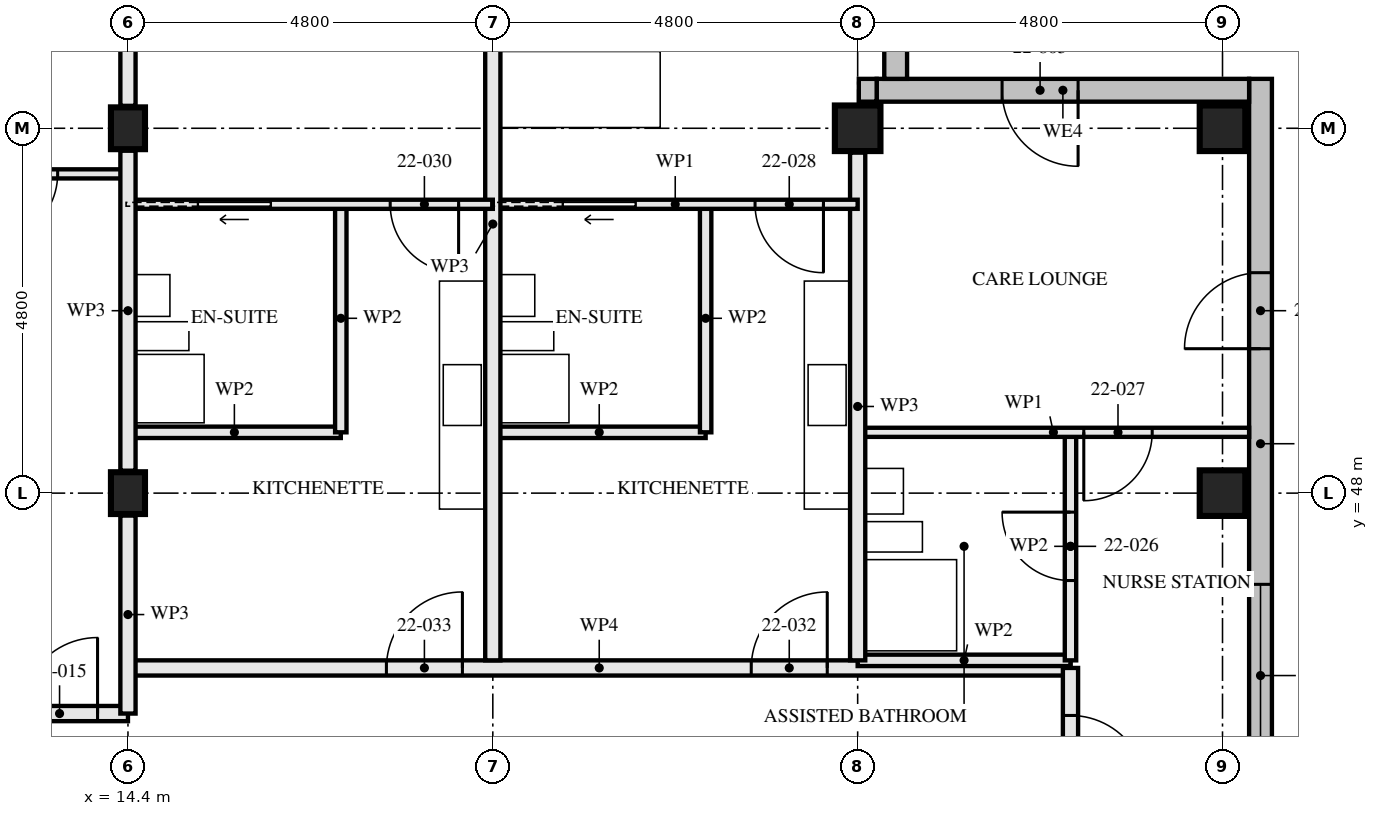
"""IFC4 building model, lengths in metres.
Left out: names, types, materials, properties, quantities, classifications, styles, units other than length and angle.
Written with IfcOpenShell. Run it as: python <this file> out.ifc"""

import sys

from ifc_helpers import new_model, si_unit, direction, frame, frame_2d, origin, origin_2d, place, context, subcontext, project, spatial, rectangle, hollow_rectangle, i_section, extrude, element, fill, save


model = new_model("IFC4")
c1 = context("Model", 3, precision=1e-05, world=origin(), true_north=direction((0.0, 1.0)))
c2 = subcontext(c1, "Body", "Model", "MODEL_VIEW")
j1 = project(units=[si_unit("LENGTHUNIT", "METRE"), si_unit("PLANEANGLEUNIT", "RADIAN")], contexts=[c1])
p1 = place(None, origin())
s1 = spatial("IfcSite", under=j1, at=p1, CompositionType="ELEMENT")
p2 = place(p1, origin())
s2 = spatial("IfcBuilding", under=s1, at=p2, CompositionType="ELEMENT")
p3 = place(p2, frame((0.0, 0.0, 84.0)))
s3 = spatial("IfcBuildingStorey", under=s2, at=p3, CompositionType="ELEMENT", Elevation=84.0)
for number, where, z_axis, x_axis in (
    (1, (14.4, 48.0, 0.0), (0.0, 0.0, 1.0), (1.0, 0.0, 0.0)),
    (2, (14.4, 52.8, 0.0), (0.0, 0.0, 1.0), (1.0, 0.0, 0.0)),
):
    element("IfcColumn", number, at=place(p3, frame(where, z_axis=z_axis, x_axis=x_axis)), inside=s3, PredefinedType="COLUMN", context=c2, shape_type="SweptSolid", body=[
        extrude(i_section(OverallWidth=0.448, OverallDepth=0.55, WebThickness=0.072, FlangeThickness=0.115, FilletRadius=0.015, at=origin_2d()), origin(), (0.0, 0.0, 1.0), 3.5),
    ])
for number, where, z_axis, x_axis in (
    (3, (24.0, 52.8, 0.0), (0.0, 0.0, 1.0), (0.0, 1.0, 0.0)),
    (4, (28.8, 48.0, 0.0), (0.0, 0.0, 1.0), (1.0, 0.0, 0.0)),
    (5, (28.8, 52.8, 0.0), (0.0, 0.0, 1.0), (0.0, 1.0, 0.0)),
):
    element("IfcColumn", number, at=place(p3, frame(where, z_axis=z_axis, x_axis=x_axis)), inside=s3, PredefinedType="COLUMN", context=c2, shape_type="SweptSolid", body=[
        extrude(hollow_rectangle(XDim=0.6, YDim=0.6, WallThickness=0.08, at=origin_2d()), origin(), (0.0, 0.0, 1.0), 3.5),
    ])
p4 = place(p3, frame((29.3, 43.85, 0.0), z_axis=(0.0, 0.0, 1.0), x_axis=(0.0, 1.0, 0.0)))
e6 = element("IfcWall", 6, at=p4, inside=s3, PredefinedType="SOLIDWALL", context=c2, shape_type="SweptSolid", body=[
    extrude(rectangle(XDim=9.6, YDim=0.3, at=frame_2d((4.8, 0.0))), origin(), (0.0, 0.0, 1.0), 3.5),
])
p5 = place(p4, frame((6.05, 0.0, 0.0)))
e7 = element("IfcOpeningElement", 7, at=p5, cuts=e6, PredefinedType="OPENING", context=c2, shape_type="SweptSolid", body=[
    extrude(rectangle(XDim=1.0, YDim=2.4, at=frame_2d((0.5, 1.2))), frame((0.0, 0.161, 0.0), z_axis=(0.0, -1.0, 0.0), x_axis=(1.0, 0.0, 0.0)), (0.0, 0.0, 1.0), 0.321),
])
p6 = place(p4, frame((0.55, 0.0, 0.6)))
e8 = element("IfcOpeningElement", 8, at=p6, cuts=e6, PredefinedType="OPENING", context=c2, shape_type="SweptSolid", body=[
    extrude(rectangle(XDim=2.4, YDim=1.8, at=frame_2d((1.2, 0.9))), frame((0.0, 0.161, 0.0), z_axis=(0.0, -1.0, 0.0), x_axis=(1.0, 0.0, 0.0)), (0.0, 0.0, 1.0), 0.321),
])
p7 = place(p3, frame((29.15, 53.3, 0.0), z_axis=(0.0, 0.0, 1.0), x_axis=(-1.0, 0.0, 0.0)))
e9 = element("IfcWall", 9, at=p7, inside=s3, PredefinedType="SOLIDWALL", context=c2, shape_type="SweptSolid", body=[
    extrude(rectangle(XDim=4.9, YDim=0.3, at=frame_2d((2.45, 0.0))), origin(), (0.0, 0.0, 1.0), 3.5),
])
p8 = place(p7, frame((2.25, 0.0, 0.0)))
e10 = element("IfcOpeningElement", 10, at=p8, cuts=e9, PredefinedType="OPENING", context=c2, shape_type="SweptSolid", body=[
    extrude(rectangle(XDim=1.0, YDim=2.4, at=frame_2d((0.5, 1.2))), frame((0.0, 0.161, 0.0), z_axis=(0.0, -1.0, 0.0), x_axis=(1.0, 0.0, 0.0)), (0.0, 0.0, 1.0), 0.321),
])
p9 = place(p3, frame((24.5, 53.45, 0.0), z_axis=(0.0, 0.0, 1.0), x_axis=(0.0, 1.0, 0.0)))
e11 = element("IfcWall", 11, at=p9, inside=s3, PredefinedType="SOLIDWALL", context=c2, shape_type="SweptSolid", body=[
    extrude(rectangle(XDim=4.5, YDim=0.3, at=frame_2d((2.25, 0.0))), origin(), (0.0, 0.0, 1.0), 3.5),
])
p10 = place(p9, frame((1.25, 0.0, 0.0)))
e12 = element("IfcOpeningElement", 12, at=p10, cuts=e11, PredefinedType="OPENING", context=c2, shape_type="SweptSolid", body=[
    extrude(rectangle(XDim=1.0, YDim=2.4, at=frame_2d((0.5, 1.2))), frame((0.0, 0.161, 0.0), z_axis=(0.0, -1.0, 0.0), x_axis=(1.0, 0.0, 0.0)), (0.0, 0.0, 1.0), 0.321),
])
p11 = place(p3, frame((24.25, 53.3, 2.39), z_axis=(0.0, 0.0, 1.0), x_axis=(-1.0, 0.0, 0.0)))
e13 = element("IfcWall", 13, at=p11, inside=s3, PredefinedType="SOLIDWALL", context=c2, shape_type="SweptSolid", body=[
    extrude(rectangle(XDim=0.235, YDim=0.3, at=frame_2d((0.118, 0.0))), origin(), (0.0, 0.0, 1.0), 0.88),
])
p12 = place(p3, frame((14.4, 52.2, 0.0), z_axis=(0.0, 0.0, 1.0), x_axis=(-1.0, 0.0, 0.0)))
e14 = element("IfcWall", 14, at=p12, inside=s3, PredefinedType="PARTITIONING", context=c2, shape_type="SweptSolid", body=[
    extrude(rectangle(XDim=4.8, YDim=0.12, at=frame_2d((2.4, 0.0))), origin(), (0.0, 0.0, 1.0), 3.33),
])
p13 = place(p12, frame((0.925, 0.0, 0.0)))
e15 = element("IfcOpeningElement", 15, at=p13, cuts=e14, PredefinedType="OPENING", context=c2, shape_type="SweptSolid", body=[
    extrude(rectangle(XDim=0.9, YDim=2.1, at=frame_2d((0.45, 1.05))), frame((0.0, 0.071, 0.0), z_axis=(0.0, -1.0, 0.0), x_axis=(1.0, 0.0, 0.0)), (0.0, 0.0, 1.0), 0.141),
])
p14 = place(p12, frame((2.925, 0.0, 0.0)))
e16 = element("IfcOpeningElement", 16, at=p14, cuts=e14, PredefinedType="OPENING", context=c2, shape_type="SweptSolid", body=[
    extrude(rectangle(XDim=0.95, YDim=2.1, at=frame_2d((0.475, 1.05))), frame((0.0, 0.071, 0.0), z_axis=(0.0, -1.0, 0.0), x_axis=(1.0, 0.0, 0.0)), (0.0, 0.0, 1.0), 0.141),
])
p15 = place(p3, frame((14.4, 45.1, 0.0), z_axis=(0.0, 0.0, 1.0), x_axis=(-1.0, 0.0, 0.0)))
e17 = element("IfcWall", 17, at=p15, inside=s3, PredefinedType="PARTITIONING", context=c2, shape_type="SweptSolid", body=[
    extrude(rectangle(XDim=9.6, YDim=0.2, at=frame_2d((4.8, 0.0))), origin(), (0.0, 0.0, 1.0), 3.33),
])
p16 = place(p15, frame((0.4, 0.0, 0.0)))
e18 = element("IfcOpeningElement", 18, at=p16, cuts=e17, PredefinedType="OPENING", context=c2, shape_type="SweptSolid", body=[
    extrude(rectangle(XDim=1.0, YDim=2.1, at=frame_2d((0.5, 1.05))), frame((0.0, 0.111, 0.0), z_axis=(0.0, -1.0, 0.0), x_axis=(1.0, 0.0, 0.0)), (0.0, 0.0, 1.0), 0.221),
])
p17 = place(p15, frame((5.2, 0.0, 0.0)))
e19 = element("IfcOpeningElement", 19, at=p17, cuts=e17, PredefinedType="OPENING", context=c2, shape_type="SweptSolid", body=[
    extrude(rectangle(XDim=1.0, YDim=2.1, at=frame_2d((0.5, 1.05))), frame((0.0, 0.111, 0.0), z_axis=(0.0, -1.0, 0.0), x_axis=(1.0, 0.0, 0.0)), (0.0, 0.0, 1.0), 0.221),
])
p18 = place(p3, frame((26.8, 48.8, 0.0), z_axis=(0.0, 0.0, 1.0), x_axis=(0.0, -1.0, 0.0)))
e20 = element("IfcWall", 20, at=p18, inside=s3, PredefinedType="PARTITIONING", context=c2, shape_type="SweptSolid", body=[
    extrude(rectangle(XDim=3.0, YDim=0.15, at=frame_2d((1.5, 0.0))), origin(), (0.0, 0.0, 1.0), 2.55),
])
p19 = place(p18, frame((1.05, 0.0, 0.0)))
e21 = element("IfcOpeningElement", 21, at=p19, cuts=e20, PredefinedType="OPENING", context=c2, shape_type="SweptSolid", body=[
    extrude(rectangle(XDim=0.9, YDim=2.1, at=frame_2d((0.45, 1.05))), frame((0.0, 0.085, 0.0), z_axis=(0.0, -1.0, 0.0), x_axis=(1.0, 0.0, 0.0)), (0.0, 0.0, 1.0), 0.171),
])
p20 = place(p3, frame((26.8, 45.8, 0.0), z_axis=(0.0, 0.0, 1.0), x_axis=(-1.0, 0.0, 0.0)))
e22 = element("IfcWall", 22, at=p20, inside=s3, PredefinedType="PARTITIONING", context=c2, shape_type="SweptSolid", body=[
    extrude(rectangle(XDim=2.8, YDim=0.15, at=frame_2d((1.4, 0.0))), origin(), (0.0, 0.0, 1.0), 3.33),
])
p21 = place(p3, frame((29.15, 48.8, 0.0), z_axis=(0.0, 0.0, 1.0), x_axis=(-1.0, 0.0, 0.0)))
e23 = element("IfcWall", 23, at=p21, inside=s3, PredefinedType="PARTITIONING", context=c2, shape_type="SweptSolid", body=[
    extrude(rectangle(XDim=5.15, YDim=0.12, at=frame_2d((2.575, 0.0))), origin(), (0.0, 0.0, 1.0), 2.32),
])
p22 = place(p21, frame((1.275, 0.0, 0.0)))
e24 = element("IfcOpeningElement", 24, at=p22, cuts=e23, PredefinedType="OPENING", context=c2, shape_type="SweptSolid", body=[
    extrude(rectangle(XDim=0.9, YDim=2.1, at=frame_2d((0.45, 1.05))), frame((0.0, 0.071, 0.0), z_axis=(0.0, -1.0, 0.0), x_axis=(1.0, 0.0, 0.0)), (0.0, 0.0, 1.0), 0.141),
])
p23 = place(p3, frame((24.0, 52.48, 0.0), z_axis=(0.0, 0.0, 1.0), x_axis=(0.0, -1.0, 0.0)))
e25 = element("IfcWall", 25, at=p23, inside=s3, PredefinedType="PARTITIONING", context=c2, shape_type="SweptSolid", body=[
    extrude(rectangle(XDim=6.68, YDim=0.2, at=frame_2d((3.34, 0.0))), origin(), (0.0, 0.0, 1.0), 2.55),
])
p24 = place(p3, frame((22.0, 51.8, 0.0), z_axis=(0.0, 0.0, 1.0), x_axis=(0.0, -1.0, 0.0)))
e26 = element("IfcWall", 26, at=p24, inside=s3, PredefinedType="PARTITIONING", context=c2, shape_type="SweptSolid", body=[
    extrude(rectangle(XDim=3.0, YDim=0.15, at=frame_2d((1.5, 0.0))), origin(), (0.0, 0.0, 1.0), 3.33),
])
p25 = place(p3, frame((22.0, 48.8, 0.0), z_axis=(0.0, 0.0, 1.0), x_axis=(-1.0, 0.0, 0.0)))
e27 = element("IfcWall", 27, at=p25, inside=s3, PredefinedType="PARTITIONING", context=c2, shape_type="SweptSolid", body=[
    extrude(rectangle(XDim=2.8, YDim=0.15, at=frame_2d((1.4, 0.0))), origin(), (0.0, 0.0, 1.0), 3.33),
])
p26 = place(p3, frame((24.0, 51.8, 0.0), z_axis=(0.0, 0.0, 1.0), x_axis=(-1.0, 0.0, 0.0)))
e28 = element("IfcWall", 28, at=p26, inside=s3, PredefinedType="PARTITIONING", context=c2, shape_type="SweptSolid", body=[
    extrude(rectangle(XDim=4.8, YDim=0.12, at=frame_2d((2.4, 0.0))), origin(), (0.0, 0.0, 1.0), 3.33),
])
p27 = place(p26, frame((0.45, 0.0, 0.0)))
e29 = element("IfcOpeningElement", 29, at=p27, cuts=e28, PredefinedType="OPENING", context=c2, shape_type="SweptSolid", body=[
    extrude(rectangle(XDim=0.9, YDim=2.1, at=frame_2d((0.45, 1.05))), frame((0.0, 0.071, 0.0), z_axis=(0.0, -1.0, 0.0), x_axis=(1.0, 0.0, 0.0)), (0.0, 0.0, 1.0), 0.141),
])
p28 = place(p26, frame((2.925, 0.0, 0.0)))
e30 = element("IfcOpeningElement", 30, at=p28, cuts=e28, PredefinedType="OPENING", context=c2, shape_type="SweptSolid", body=[
    extrude(rectangle(XDim=0.95, YDim=2.1, at=frame_2d((0.475, 1.05))), frame((0.0, 0.071, 0.0), z_axis=(0.0, -1.0, 0.0), x_axis=(1.0, 0.0, 0.0)), (0.0, 0.0, 1.0), 0.141),
])
p29 = place(p3, frame((19.2, 57.28, 0.0), z_axis=(0.0, 0.0, 1.0), x_axis=(0.0, -1.0, 0.0)))
e31 = element("IfcWall", 31, at=p29, inside=s3, PredefinedType="PARTITIONING", context=c2, shape_type="SweptSolid", body=[
    extrude(rectangle(XDim=11.48, YDim=0.2, at=frame_2d((5.74, 0.0))), origin(), (0.0, 0.0, 1.0), 2.55),
])
p30 = place(p3, frame((17.2, 51.8, 0.0), z_axis=(0.0, 0.0, 1.0), x_axis=(0.0, -1.0, 0.0)))
e32 = element("IfcWall", 32, at=p30, inside=s3, PredefinedType="PARTITIONING", context=c2, shape_type="SweptSolid", body=[
    extrude(rectangle(XDim=3.0, YDim=0.15, at=frame_2d((1.5, 0.0))), origin(), (0.0, 0.0, 1.0), 3.33),
])
p31 = place(p3, frame((17.2, 48.8, 0.0), z_axis=(0.0, 0.0, 1.0), x_axis=(-1.0, 0.0, 0.0)))
e33 = element("IfcWall", 33, at=p31, inside=s3, PredefinedType="PARTITIONING", context=c2, shape_type="SweptSolid", body=[
    extrude(rectangle(XDim=2.8, YDim=0.15, at=frame_2d((1.4, 0.0))), origin(), (0.0, 0.0, 1.0), 3.33),
])
p32 = place(p3, frame((19.2, 51.8, 0.0), z_axis=(0.0, 0.0, 1.0), x_axis=(-1.0, 0.0, 0.0)))
e34 = element("IfcWall", 34, at=p32, inside=s3, PredefinedType="PARTITIONING", context=c2, shape_type="SweptSolid", body=[
    extrude(rectangle(XDim=4.8, YDim=0.12, at=frame_2d((2.4, 0.0))), origin(), (0.0, 0.0, 1.0), 3.33),
])
p33 = place(p32, frame((0.45, 0.0, 0.0)))
e35 = element("IfcOpeningElement", 35, at=p33, cuts=e34, PredefinedType="OPENING", context=c2, shape_type="SweptSolid", body=[
    extrude(rectangle(XDim=0.9, YDim=2.1, at=frame_2d((0.45, 1.05))), frame((0.0, 0.071, 0.0), z_axis=(0.0, -1.0, 0.0), x_axis=(1.0, 0.0, 0.0)), (0.0, 0.0, 1.0), 0.141),
])
p34 = place(p32, frame((2.925, 0.0, 0.0)))
e36 = element("IfcOpeningElement", 36, at=p34, cuts=e34, PredefinedType="OPENING", context=c2, shape_type="SweptSolid", body=[
    extrude(rectangle(XDim=0.95, YDim=2.1, at=frame_2d((0.475, 1.05))), frame((0.0, 0.071, 0.0), z_axis=(0.0, -1.0, 0.0), x_axis=(1.0, 0.0, 0.0)), (0.0, 0.0, 1.0), 0.141),
])
p35 = place(p3, frame((26.8, 45.7, 0.0), z_axis=(0.0, 0.0, 1.0), x_axis=(-1.0, 0.0, 0.0)))
e37 = element("IfcWall", 37, at=p35, inside=s3, PredefinedType="PARTITIONING", context=c2, shape_type="SweptSolid", body=[
    extrude(rectangle(XDim=12.4, YDim=0.2, at=frame_2d((6.2, 0.0))), origin(), (0.0, 0.0, 1.0), 3.33),
])
p36 = place(p35, frame((3.2, 0.0, 0.0)))
e38 = element("IfcOpeningElement", 38, at=p36, cuts=e37, PredefinedType="OPENING", context=c2, shape_type="SweptSolid", body=[
    extrude(rectangle(XDim=1.0, YDim=2.1, at=frame_2d((0.5, 1.05))), frame((0.0, 0.111, 0.0), z_axis=(0.0, -1.0, 0.0), x_axis=(1.0, 0.0, 0.0)), (0.0, 0.0, 1.0), 0.221),
])
p37 = place(p35, frame((8.0, 0.0, 0.0)))
e39 = element("IfcOpeningElement", 39, at=p37, cuts=e37, PredefinedType="OPENING", context=c2, shape_type="SweptSolid", body=[
    extrude(rectangle(XDim=1.0, YDim=2.1, at=frame_2d((0.5, 1.05))), frame((0.0, 0.111, 0.0), z_axis=(0.0, -1.0, 0.0), x_axis=(1.0, 0.0, 0.0)), (0.0, 0.0, 1.0), 0.221),
])
p38 = place(p3, frame((14.4, 45.1, 0.0), z_axis=(0.0, 0.0, 1.0), x_axis=(0.0, 1.0, 0.0)))
e40 = element("IfcWall", 40, at=p38, inside=s3, PredefinedType="PARTITIONING", context=c2, shape_type="SweptSolid", body=[
    extrude(rectangle(XDim=2.605, YDim=0.2, at=frame_2d((1.302, 0.0))), origin(), (0.0, 0.0, 1.0), 2.32),
])
p39 = place(p3, frame((14.4, 48.295, 0.0), z_axis=(0.0, 0.0, 1.0), x_axis=(0.0, 1.0, 0.0)))
e41 = element("IfcWall", 41, at=p39, inside=s3, PredefinedType="PARTITIONING", context=c2, shape_type="SweptSolid", body=[
    extrude(rectangle(XDim=4.21, YDim=0.2, at=frame_2d((2.105, 0.0))), origin(), (0.0, 0.0, 1.0), 2.32),
])
p40 = place(p3, frame((14.4, 53.095, 0.0), z_axis=(0.0, 0.0, 1.0), x_axis=(0.0, 1.0, 0.0)))
e42 = element("IfcWall", 42, at=p40, inside=s3, PredefinedType="PARTITIONING", context=c2, shape_type="SweptSolid", body=[
    extrude(rectangle(XDim=4.258, YDim=0.2, at=frame_2d((2.129, 0.0))), origin(), (0.0, 0.0, 1.0), 2.32),
])
p41 = place(p3, frame((26.8, 45.7, 0.0), z_axis=(0.0, 0.0, 1.0), x_axis=(0.0, -1.0, 0.0)))
e43 = element("IfcWall", 43, at=p41, inside=s3, PredefinedType="PARTITIONING", context=c2, shape_type="SweptSolid", body=[
    extrude(rectangle(XDim=2.25, YDim=0.2, at=frame_2d((1.125, 0.0))), origin(), (0.0, 0.0, 1.0), 3.33),
])
p42 = place(p41, frame((0.625, 0.0, 0.0)))
e44 = element("IfcOpeningElement", 44, at=p42, cuts=e43, PredefinedType="OPENING", context=c2, shape_type="SweptSolid", body=[
    extrude(rectangle(XDim=1.0, YDim=2.1, at=frame_2d((0.5, 1.05))), frame((0.0, 0.111, 0.0), z_axis=(0.0, -1.0, 0.0), x_axis=(1.0, 0.0, 0.0)), (0.0, 0.0, 1.0), 0.221),
])
p43 = place(p5, origin())
e45 = element("IfcDoor", 45, at=p43, inside=s3, OperationType="SINGLE_SWING_LEFT", PredefinedType="DOOR", context=c2, shape_type="SweptSolid", body=[
    extrude(rectangle(XDim=1.0, YDim=2.4, at=frame_2d((0.5, 1.2))), frame((0.0, 0.035, 0.0), z_axis=(0.0, -1.0, 0.0), x_axis=(1.0, 0.0, 0.0)), (0.0, 0.0, 1.0), 0.07),
])
fill(e7, e45)
p44 = place(p6, origin())
e46 = element("IfcWindow", 46, at=p44, inside=s3, PartitioningType="SINGLE_PANEL", PredefinedType="WINDOW", context=c2, shape_type="SweptSolid", body=[
    extrude(rectangle(XDim=2.4, YDim=1.8, at=frame_2d((1.2, 0.9))), frame((0.0, 0.03, 0.0), z_axis=(0.0, -1.0, 0.0), x_axis=(1.0, 0.0, 0.0)), (0.0, 0.0, 1.0), 0.06),
])
fill(e8, e46)
p45 = place(p8, origin())
e47 = element("IfcDoor", 47, at=p45, inside=s3, OperationType="SINGLE_SWING_LEFT", PredefinedType="DOOR", context=c2, shape_type="SweptSolid", body=[
    extrude(rectangle(XDim=1.0, YDim=2.4, at=frame_2d((0.5, 1.2))), frame((0.0, 0.035, 0.0), z_axis=(0.0, -1.0, 0.0), x_axis=(1.0, 0.0, 0.0)), (0.0, 0.0, 1.0), 0.07),
])
fill(e10, e47)
p46 = place(p13, origin())
e48 = element("IfcDoor", 48, at=p46, inside=s3, OperationType="SINGLE_SWING_LEFT", PredefinedType="DOOR", context=c2, shape_type="SweptSolid", body=[
    extrude(rectangle(XDim=0.9, YDim=2.1, at=frame_2d((0.45, 1.05))), frame((0.0, 0.022, 0.0), z_axis=(0.0, -1.0, 0.0), x_axis=(1.0, 0.0, 0.0)), (0.0, 0.0, 1.0), 0.044),
])
fill(e15, e48)
p47 = place(p16, frame((1.0, 0.0, 0.0), z_axis=(0.0, 0.0, 1.0), x_axis=(-1.0, 0.0, 0.0)))
e49 = element("IfcDoor", 49, at=p47, inside=s3, OperationType="SINGLE_SWING_LEFT", PredefinedType="DOOR", context=c2, shape_type="SweptSolid", body=[
    extrude(rectangle(XDim=1.0, YDim=2.1, at=frame_2d((0.5, 1.05))), frame((0.0, 0.027, 0.0), z_axis=(0.0, -1.0, 0.0), x_axis=(1.0, 0.0, 0.0)), (0.0, 0.0, 1.0), 0.054),
])
fill(e18, e49)
p48 = place(p19, frame((0.9, 0.0, 0.0), z_axis=(0.0, 0.0, 1.0), x_axis=(-1.0, 0.0, 0.0)))
e50 = element("IfcDoor", 50, at=p48, inside=s3, OperationType="SINGLE_SWING_LEFT", PredefinedType="DOOR", context=c2, shape_type="SweptSolid", body=[
    extrude(rectangle(XDim=0.9, YDim=2.1, at=frame_2d((0.45, 1.05))), frame((0.0, 0.022, 0.0), z_axis=(0.0, -1.0, 0.0), x_axis=(1.0, 0.0, 0.0)), (0.0, 0.0, 1.0), 0.044),
])
fill(e21, e50)
p49 = place(p22, origin())
e51 = element("IfcDoor", 51, at=p49, inside=s3, OperationType="SINGLE_SWING_LEFT", PredefinedType="DOOR", context=c2, shape_type="SweptSolid", body=[
    extrude(rectangle(XDim=0.9, YDim=2.1, at=frame_2d((0.45, 1.05))), frame((0.0, 0.022, 0.0), z_axis=(0.0, -1.0, 0.0), x_axis=(1.0, 0.0, 0.0)), (0.0, 0.0, 1.0), 0.044),
])
fill(e24, e51)
p50 = place(p27, origin())
e52 = element("IfcDoor", 52, at=p50, inside=s3, OperationType="SINGLE_SWING_RIGHT", PredefinedType="DOOR", context=c2, shape_type="SweptSolid", body=[
    extrude(rectangle(XDim=0.9, YDim=2.1, at=frame_2d((0.45, 1.05))), frame((0.0, 0.022, 0.0), z_axis=(0.0, -1.0, 0.0), x_axis=(1.0, 0.0, 0.0)), (0.0, 0.0, 1.0), 0.044),
])
fill(e29, e52)
p51 = place(p28, origin())
e53 = element("IfcDoor", 53, at=p51, inside=s3, OperationType="SLIDING_TO_LEFT", PredefinedType="DOOR", context=c2, shape_type="SweptSolid", body=[
    extrude(rectangle(XDim=0.95, YDim=2.1, at=frame_2d((0.475, 1.05))), frame((0.0, 0.022, 0.0), z_axis=(0.0, -1.0, 0.0), x_axis=(1.0, 0.0, 0.0)), (0.0, 0.0, 1.0), 0.044),
])
fill(e30, e53)
p52 = place(p33, origin())
e54 = element("IfcDoor", 54, at=p52, inside=s3, OperationType="SINGLE_SWING_RIGHT", PredefinedType="DOOR", context=c2, shape_type="SweptSolid", body=[
    extrude(rectangle(XDim=0.9, YDim=2.1, at=frame_2d((0.45, 1.05))), frame((0.0, 0.022, 0.0), z_axis=(0.0, -1.0, 0.0), x_axis=(1.0, 0.0, 0.0)), (0.0, 0.0, 1.0), 0.044),
])
fill(e35, e54)
p53 = place(p34, origin())
e55 = element("IfcDoor", 55, at=p53, inside=s3, OperationType="SLIDING_TO_LEFT", PredefinedType="DOOR", context=c2, shape_type="SweptSolid", body=[
    extrude(rectangle(XDim=0.95, YDim=2.1, at=frame_2d((0.475, 1.05))), frame((0.0, 0.022, 0.0), z_axis=(0.0, -1.0, 0.0), x_axis=(1.0, 0.0, 0.0)), (0.0, 0.0, 1.0), 0.044),
])
fill(e36, e55)
p54 = place(p36, frame((1.0, 0.0, 0.0), z_axis=(0.0, 0.0, 1.0), x_axis=(-1.0, 0.0, 0.0)))
e56 = element("IfcDoor", 56, at=p54, inside=s3, OperationType="SINGLE_SWING_LEFT", PredefinedType="DOOR", context=c2, shape_type="SweptSolid", body=[
    extrude(rectangle(XDim=1.0, YDim=2.1, at=frame_2d((0.5, 1.05))), frame((0.0, 0.027, 0.0), z_axis=(0.0, -1.0, 0.0), x_axis=(1.0, 0.0, 0.0)), (0.0, 0.0, 1.0), 0.054),
])
fill(e38, e56)
p55 = place(p37, frame((1.0, 0.0, 0.0), z_axis=(0.0, 0.0, 1.0), x_axis=(-1.0, 0.0, 0.0)))
e57 = element("IfcDoor", 57, at=p55, inside=s3, OperationType="SINGLE_SWING_LEFT", PredefinedType="DOOR", context=c2, shape_type="SweptSolid", body=[
    extrude(rectangle(XDim=1.0, YDim=2.1, at=frame_2d((0.5, 1.05))), frame((0.0, 0.027, 0.0), z_axis=(0.0, -1.0, 0.0), x_axis=(1.0, 0.0, 0.0)), (0.0, 0.0, 1.0), 0.054),
])
fill(e39, e57)
p56 = place(p42, origin())
e58 = element("IfcDoor", 58, at=p56, inside=s3, OperationType="SINGLE_SWING_LEFT", PredefinedType="DOOR", context=c2, shape_type="SweptSolid", body=[
    extrude(rectangle(XDim=1.0, YDim=2.1, at=frame_2d((0.5, 1.05))), frame((0.0, 0.027, 0.0), z_axis=(0.0, -1.0, 0.0), x_axis=(1.0, 0.0, 0.0)), (0.0, 0.0, 1.0), 0.054),
])
fill(e44, e58)
save(model, sys.argv[1])
